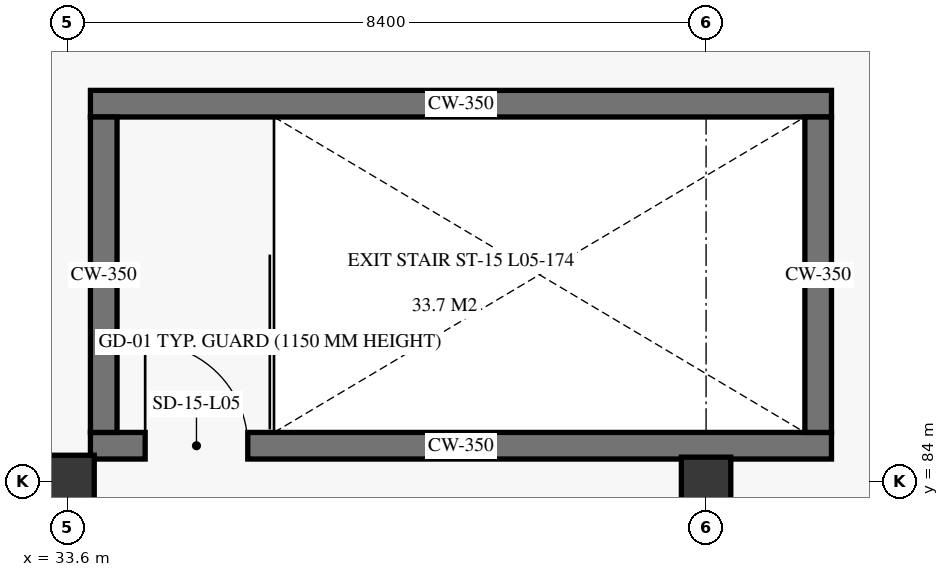
"""IFC4 building model, lengths in metres.
Left out: names, types, materials, properties, quantities, classifications, styles, units other than length and angle.
Written with IfcOpenShell. Run it as: python <this file> out.ifc"""

import sys

from ifc_helpers import new_model, si_unit, direction, frame, frame_2d, origin, origin_2d, place, context, subcontext, project, spatial, rectangle, extrude, element, fill, save


model = new_model("IFC4")
c1 = context("Model", 3, precision=1e-05, world=origin(), true_north=direction((0.0, 1.0)))
c2 = subcontext(c1, "Body", "Model", "MODEL_VIEW")
j1 = project(units=[si_unit("LENGTHUNIT", "METRE"), si_unit("PLANEANGLEUNIT", "RADIAN")], contexts=[c1])
p1 = place(None, origin())
s1 = spatial("IfcSite", under=j1, at=p1, CompositionType="ELEMENT")
p2 = place(p1, origin())
s2 = spatial("IfcBuilding", under=s1, at=p2, CompositionType="ELEMENT")
p3 = place(p2, frame((0.0, 0.0, 22.2)))
s3 = spatial("IfcBuildingStorey", under=s2, at=p3, CompositionType="ELEMENT", Elevation=22.2)
p4 = place(p3, frame((33.6, 84.0, 0.0), z_axis=(0.0, 0.0, 1.0), x_axis=(1.0, 0.0, 0.0)))
e1 = element("IfcColumn", 1, at=p4, inside=s3, PredefinedType="COLUMN", context=c2, shape_type="SweptSolid", body=[
    extrude(rectangle(XDim=0.7, YDim=0.7, at=origin_2d()), origin(), (0.0, 0.0, 1.0), 4.22),
])
p5 = place(p3, frame((42.0, 84.0, 0.0), z_axis=(0.0, 0.0, 1.0), x_axis=(1.0, 0.0, 0.0)))
e2 = element("IfcColumn", 2, at=p5, inside=s3, PredefinedType="COLUMN", context=c2, shape_type="SweptSolid", body=[
    extrude(rectangle(XDim=0.65, YDim=0.65, at=origin_2d()), origin(), (0.0, 0.0, 1.0), 4.22),
])
p6 = place(p3, frame((33.9, 84.475, 0.0), z_axis=(0.0, 0.0, 1.0), x_axis=(1.0, 0.0, 0.0)))
e3 = element("IfcWall", 3, at=p6, inside=s3, PredefinedType="SHEAR", context=c2, shape_type="SweptSolid", body=[
    extrude(rectangle(XDim=9.75, YDim=0.35, at=frame_2d((4.875, 0.0))), origin(), (0.0, 0.0, 1.0), 4.22),
])
p7 = place(p6, frame((0.72, 0.0, 0.0)))
e4 = element("IfcOpeningElement", 4, at=p7, cuts=e3, PredefinedType="OPENING", context=c2, shape_type="SweptSolid", body=[
    extrude(rectangle(XDim=1.35, YDim=2.25, at=frame_2d((0.675, 1.125))), frame((0.0, 0.185, 0.0), z_axis=(0.0, -1.0, 0.0), x_axis=(1.0, 0.0, 0.0)), (0.0, 0.0, 1.0), 0.37),
])
p8 = place(p3, frame((33.9, 88.975, 0.0), z_axis=(0.0, 0.0, 1.0), x_axis=(1.0, 0.0, 0.0)))
e5 = element("IfcWall", 5, at=p8, inside=s3, PredefinedType="SHEAR", context=c2, shape_type="SweptSolid", body=[
    extrude(rectangle(XDim=9.75, YDim=0.35, at=frame_2d((4.875, 0.0))), origin(), (0.0, 0.0, 1.0), 4.22),
])
for number, where, z_axis, x_axis in (
    (6, (34.075, 84.65, 0.0), (0.0, 0.0, 1.0), (0.0, 1.0, 0.0)),
    (7, (43.475, 84.65, 0.0), (0.0, 0.0, 1.0), (0.0, 1.0, 0.0)),
):
    element("IfcWall", number, at=place(p3, frame(where, z_axis=z_axis, x_axis=x_axis)), inside=s3, PredefinedType="SHEAR", context=c2, shape_type="SweptSolid", body=[
        extrude(rectangle(XDim=4.15, YDim=0.35, at=frame_2d((2.075, 0.0))), origin(), (0.0, 0.0, 1.0), 4.22),
    ])
p9 = place(p7, origin())
e8 = element("IfcDoor", 8, at=p9, inside=s3, OperationType="SINGLE_SWING_LEFT", PredefinedType="DOOR", context=c2, shape_type="SweptSolid", body=[
    extrude(rectangle(XDim=1.35, YDim=2.25, at=frame_2d((0.675, 1.125))), frame((0.0, 0.025, 0.0), z_axis=(0.0, -1.0, 0.0), x_axis=(1.0, 0.0, 0.0)), (0.0, 0.0, 1.0), 0.05),
])
fill(e4, e8)
save(model, sys.argv[1])
